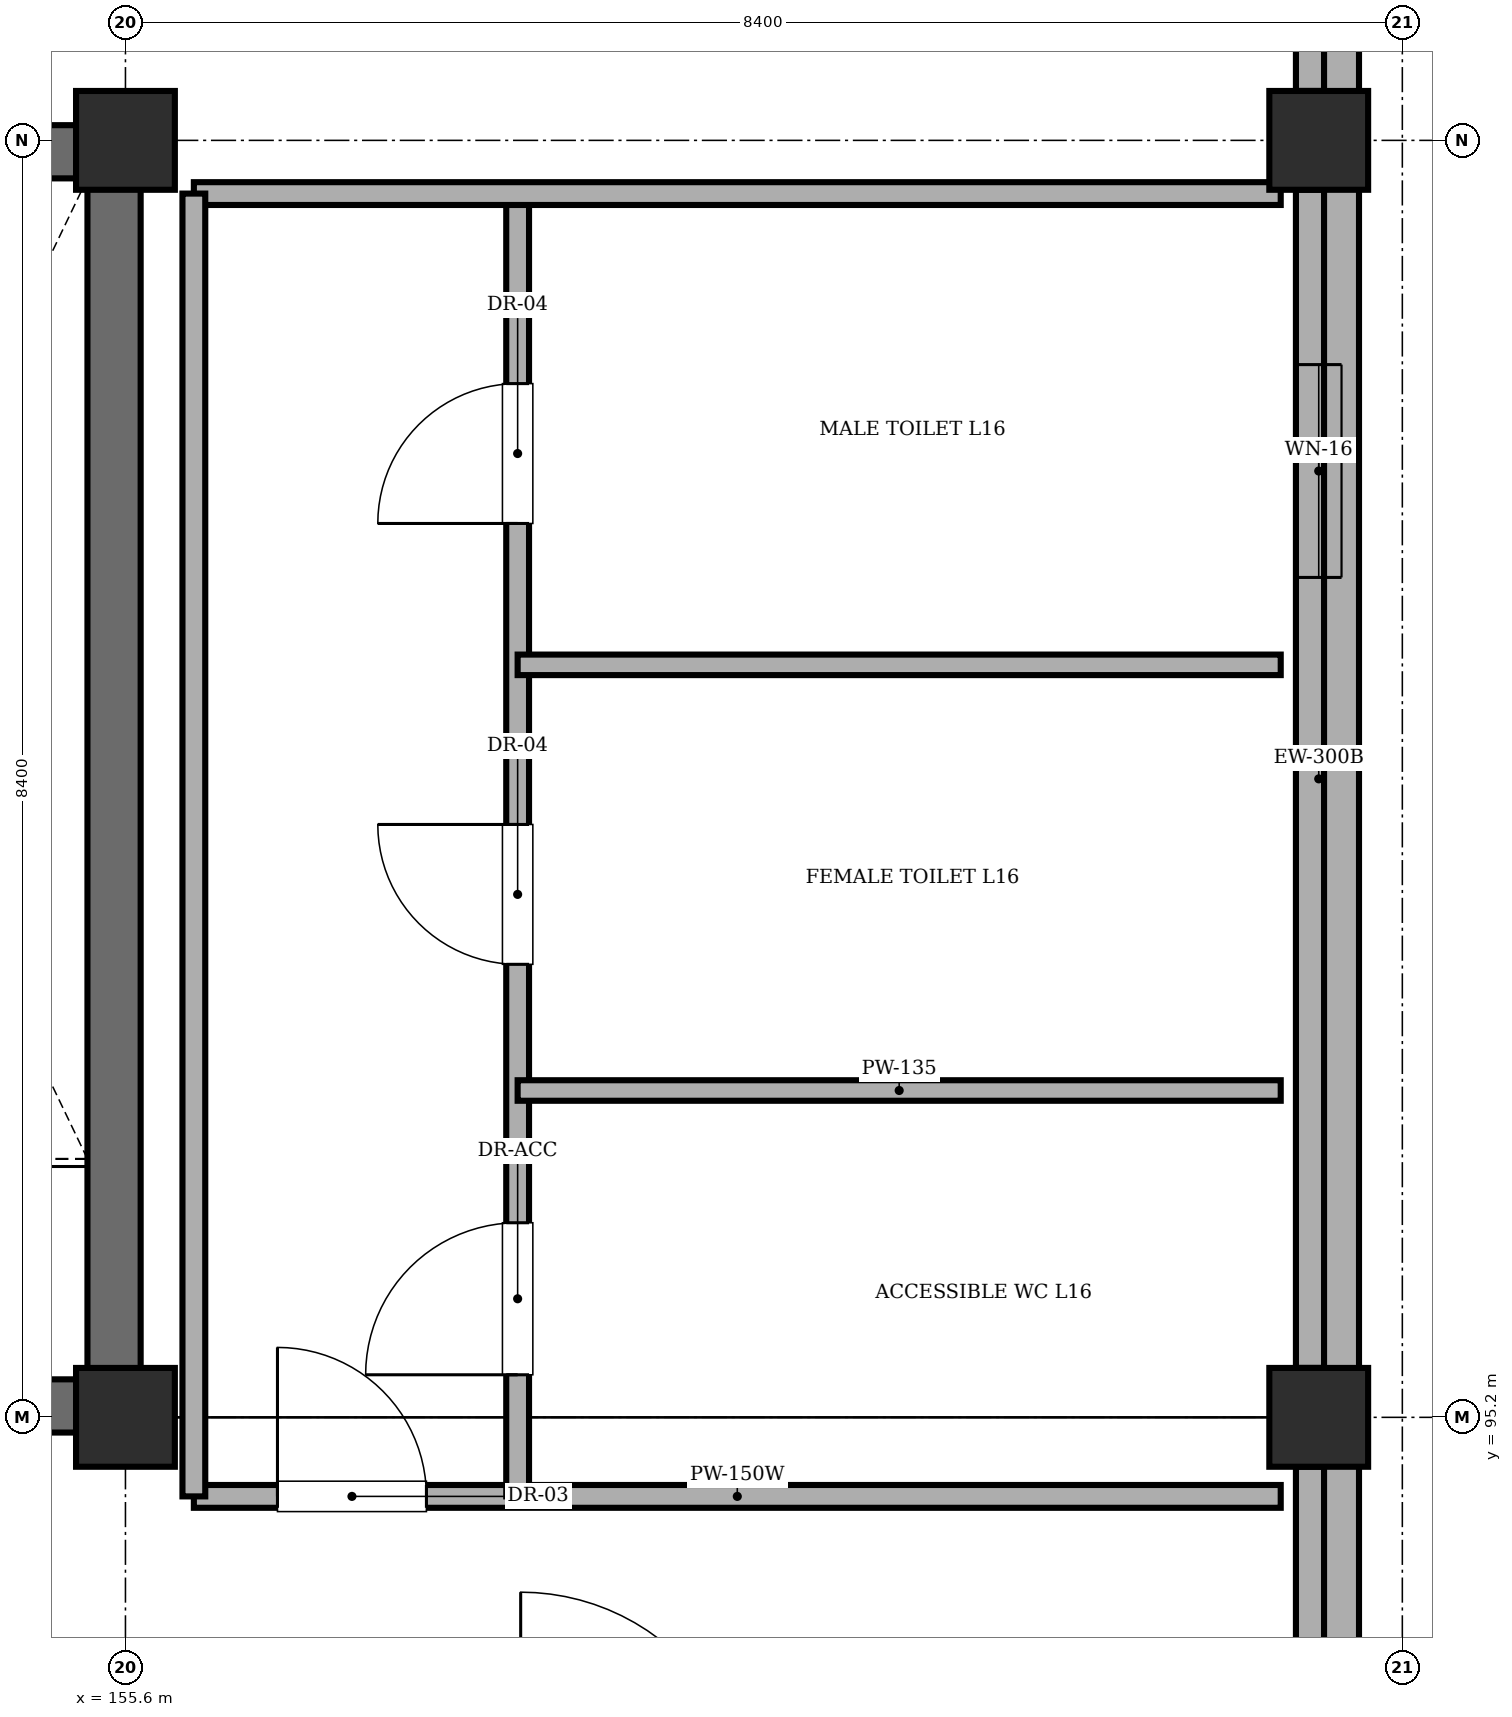
"""IFC4 building model, lengths in metres.
Left out: names, types, materials, properties, quantities, classifications, styles, units other than length and angle.
Written with IfcOpenShell. Run it as: python <this file> out.ifc"""

import sys

from ifc_helpers import new_model, si_unit, direction, frame, frame_2d, origin, origin_2d, place, context, subcontext, project, spatial, rectangle, extrude, element, fill, save


model = new_model("IFC4")
c1 = context("Model", 3, precision=1e-05, world=origin(), true_north=direction((0.0, 1.0)))
c2 = subcontext(c1, "Body", "Model", "MODEL_VIEW")
j1 = project(units=[si_unit("LENGTHUNIT", "METRE"), si_unit("PLANEANGLEUNIT", "RADIAN")], contexts=[c1])
p1 = place(None, origin())
s1 = spatial("IfcSite", under=j1, at=p1, CompositionType="ELEMENT")
p2 = place(p1, origin())
s2 = spatial("IfcBuilding", under=s1, at=p2, CompositionType="ELEMENT")
p3 = place(p2, frame((0.0, 0.0, 65.7)))
s3 = spatial("IfcBuildingStorey", under=s2, at=p3, CompositionType="ELEMENT", Elevation=65.7)
for number, where, z_axis, x_axis in (
    (1, (155.6, 95.2, 0.0), (0.0, 0.0, 1.0), (1.0, 0.0, 0.0)),
    (2, (155.6, 103.6, 0.0), (0.0, 0.0, 1.0), (1.0, 0.0, 0.0)),
    (3, (163.45, 95.2, 0.0), (0.0, 0.0, 1.0), (1.0, 0.0, 0.0)),
    (4, (163.45, 103.6, 0.0), (0.0, 0.0, 1.0), (1.0, 0.0, 0.0)),
):
    element("IfcColumn", number, at=place(p3, frame(where, z_axis=z_axis, x_axis=x_axis)), inside=s3, PredefinedType="COLUMN", context=c2, shape_type="SweptSolid", body=[
        extrude(rectangle(XDim=0.65, YDim=0.65, at=origin_2d()), origin(), (0.0, 0.0, 1.0), 4.3),
    ])
for number, where, z_axis, x_axis in (
    (5, (151.9, 95.275, 0.0), (0.0, 0.0, 1.0), (1.0, 0.0, 0.0)),
    (6, (151.9, 103.525, 0.0), (0.0, 0.0, 1.0), (1.0, 0.0, 0.0)),
):
    element("IfcWall", number, at=place(p3, frame(where, z_axis=z_axis, x_axis=x_axis)), inside=s3, PredefinedType="SHEAR", context=c2, shape_type="SweptSolid", body=[
        extrude(rectangle(XDim=3.8, YDim=0.35, at=frame_2d((1.9, 0.0))), origin(), (0.0, 0.0, 1.0), 4.3),
    ])
p4 = place(p3, frame((155.525, 95.45, 0.0), z_axis=(0.0, 0.0, 1.0), x_axis=(0.0, 1.0, 0.0)))
e7 = element("IfcWall", 7, at=p4, inside=s3, PredefinedType="SHEAR", context=c2, shape_type="SweptSolid", body=[
    extrude(rectangle(XDim=7.9, YDim=0.35, at=frame_2d((3.95, 0.0))), origin(), (0.0, 0.0, 1.0), 4.3),
])
p5 = place(p3, frame((163.45, 94.875, 0.0), z_axis=(0.0, 0.0, 1.0), x_axis=(0.0, -1.0, 0.0)))
e8 = element("IfcWall", 8, at=p5, inside=s3, PredefinedType="STANDARD", context=c2, shape_type="SweptSolid", body=[
    extrude(rectangle(XDim=7.75, YDim=0.3, at=frame_2d((3.875, 0.0))), origin(), (0.0, 0.0, 1.0), 3.7),
])
p6 = place(p5, frame((4.2, 0.0, 1.1)))
e9 = element("IfcOpeningElement", 9, at=p6, cuts=e8, PredefinedType="OPENING", context=c2, shape_type="SweptSolid", body=[
    extrude(rectangle(XDim=1.8, YDim=1.8, at=frame_2d((0.9, 0.9))), frame((0.0, 0.16, 0.0), z_axis=(0.0, -1.0, 0.0), x_axis=(1.0, 0.0, 0.0)), (0.0, 0.0, 1.0), 0.32),
])
p7 = place(p3, frame((163.45, 103.275, 0.0), z_axis=(0.0, 0.0, 1.0), x_axis=(0.0, -1.0, 0.0)))
e10 = element("IfcWall", 10, at=p7, inside=s3, PredefinedType="STANDARD", context=c2, shape_type="SweptSolid", body=[
    extrude(rectangle(XDim=7.75, YDim=0.3, at=frame_2d((3.875, 0.0))), origin(), (0.0, 0.0, 1.0), 3.7),
])
p8 = place(p7, frame((1.15, 0.0, 1.1)))
e11 = element("IfcOpeningElement", 11, at=p8, cuts=e10, PredefinedType="OPENING", context=c2, shape_type="SweptSolid", body=[
    extrude(rectangle(XDim=1.4, YDim=1.4, at=frame_2d((0.7, 0.7))), frame((0.0, 0.16, 0.0), z_axis=(0.0, -1.0, 0.0), x_axis=(1.0, 0.0, 0.0)), (0.0, 0.0, 1.0), 0.32),
])
p9 = place(p3, frame((163.45, 111.125, 0.0), z_axis=(0.0, 0.0, 1.0), x_axis=(0.0, -1.0, 0.0)))
e12 = element("IfcWall", 12, at=p9, inside=s3, PredefinedType="STANDARD", context=c2, shape_type="SweptSolid", body=[
    extrude(rectangle(XDim=7.2, YDim=0.3, at=frame_2d((3.6, 0.0))), origin(), (0.0, 0.0, 1.0), 3.7),
])
p10 = place(p9, frame((1.15, 0.0, 1.1)))
e13 = element("IfcOpeningElement", 13, at=p10, cuts=e12, PredefinedType="OPENING", context=c2, shape_type="SweptSolid", body=[
    extrude(rectangle(XDim=1.8, YDim=1.8, at=frame_2d((0.9, 0.9))), frame((0.0, 0.16, 0.0), z_axis=(0.0, -1.0, 0.0), x_axis=(1.0, 0.0, 0.0)), (0.0, 0.0, 1.0), 0.32),
])
p11 = place(p3, frame((163.6, 78.515, 4.5), z_axis=(0.0, 0.0, 1.0), x_axis=(0.0, 1.0, 0.0)))
e14 = element("IfcWall", 14, at=p11, inside=s3, PredefinedType="PARAPET", context=c2, shape_type="SweptSolid", body=[
    extrude(rectangle(XDim=32.97, YDim=0.23, at=frame_2d((16.485, 0.0))), origin(), (0.0, 0.0, 1.0), 1.35),
])
p12 = place(p3, frame((156.05, 94.68, 0.0), z_axis=(0.0, 0.0, 1.0), x_axis=(1.0, 0.0, 0.0)))
e15 = element("IfcWall", 15, at=p12, inside=s3, PredefinedType="PARTITIONING", context=c2, shape_type="SweptSolid", body=[
    extrude(rectangle(XDim=7.15, YDim=0.15, at=frame_2d((3.575, 0.0))), origin(), (0.0, 0.0, 1.0), 4.3),
])
p13 = place(p12, frame((0.55, 0.0, 0.0)))
e16 = element("IfcOpeningElement", 16, at=p13, cuts=e15, PredefinedType="OPENING", context=c2, shape_type="SweptSolid", body=[
    extrude(rectangle(XDim=0.98, YDim=2.12, at=frame_2d((0.49, 1.06))), frame((0.0, 0.085, 0.0), z_axis=(0.0, -1.0, 0.0), x_axis=(1.0, 0.0, 0.0)), (0.0, 0.0, 1.0), 0.17),
])
p14 = place(p3, frame((158.18, 94.68, 0.0), z_axis=(0.0, 0.0, 1.0), x_axis=(0.0, 1.0, 0.0)))
e17 = element("IfcWall", 17, at=p14, inside=s3, PredefinedType="PARTITIONING", context=c2, shape_type="SweptSolid", body=[
    extrude(rectangle(XDim=8.57, YDim=0.15, at=frame_2d((4.285, 0.0))), origin(), (0.0, 0.0, 1.0), 4.3),
])
p15 = place(p14, frame((0.8, 0.0, 0.0)))
e18 = element("IfcOpeningElement", 18, at=p15, cuts=e17, PredefinedType="OPENING", context=c2, shape_type="SweptSolid", body=[
    extrude(rectangle(XDim=1.0, YDim=2.12, at=frame_2d((0.5, 1.06))), frame((0.0, 0.085, 0.0), z_axis=(0.0, -1.0, 0.0), x_axis=(1.0, 0.0, 0.0)), (0.0, 0.0, 1.0), 0.17),
])
p16 = place(p14, frame((3.5, 0.0, 0.0)))
e19 = element("IfcOpeningElement", 19, at=p16, cuts=e17, PredefinedType="OPENING", context=c2, shape_type="SweptSolid", body=[
    extrude(rectangle(XDim=0.92, YDim=2.1, at=frame_2d((0.46, 1.05))), frame((0.0, 0.085, 0.0), z_axis=(0.0, -1.0, 0.0), x_axis=(1.0, 0.0, 0.0)), (0.0, 0.0, 1.0), 0.17),
])
p17 = place(p14, frame((6.4, 0.0, 0.0)))
e20 = element("IfcOpeningElement", 20, at=p17, cuts=e17, PredefinedType="OPENING", context=c2, shape_type="SweptSolid", body=[
    extrude(rectangle(XDim=0.92, YDim=2.1, at=frame_2d((0.46, 1.05))), frame((0.0, 0.085, 0.0), z_axis=(0.0, -1.0, 0.0), x_axis=(1.0, 0.0, 0.0)), (0.0, 0.0, 1.0), 0.17),
])
for number, where, z_axis, x_axis in (
    (21, (158.18, 97.35, 0.0), (0.0, 0.0, 1.0), (1.0, 0.0, 0.0)),
    (22, (158.18, 100.15, 0.0), (0.0, 0.0, 1.0), (1.0, 0.0, 0.0)),
):
    element("IfcWall", number, at=place(p3, frame(where, z_axis=z_axis, x_axis=x_axis)), inside=s3, PredefinedType="PARTITIONING", context=c2, shape_type="SweptSolid", body=[
        extrude(rectangle(XDim=5.02, YDim=0.135, at=frame_2d((2.51, 0.0))), origin(), (0.0, 0.0, 1.0), 4.3),
    ])
p18 = place(p3, frame((156.05, 103.25, 0.0), z_axis=(0.0, 0.0, 1.0), x_axis=(1.0, 0.0, 0.0)))
e23 = element("IfcWall", 23, at=p18, inside=s3, PredefinedType="PARTITIONING", context=c2, shape_type="SweptSolid", body=[
    extrude(rectangle(XDim=7.15, YDim=0.15, at=frame_2d((3.575, 0.0))), origin(), (0.0, 0.0, 1.0), 4.3),
])
p19 = place(p3, frame((156.05, 94.68, 0.0), z_axis=(0.0, 0.0, 1.0), x_axis=(0.0, 1.0, 0.0)))
e24 = element("IfcWall", 24, at=p19, inside=s3, PredefinedType="PARTITIONING", context=c2, shape_type="SweptSolid", body=[
    extrude(rectangle(XDim=8.57, YDim=0.15, at=frame_2d((4.285, 0.0))), origin(), (0.0, 0.0, 1.0), 4.3),
])
p20 = place(p8, origin())
e25 = element("IfcWindow", 25, at=p20, inside=s3, PartitioningType="SINGLE_PANEL", PredefinedType="WINDOW", context=c2, shape_type="SweptSolid", body=[
    extrude(rectangle(XDim=1.4, YDim=1.4, at=frame_2d((0.7, 0.7))), frame((0.0, 0.03, 0.0), z_axis=(0.0, -1.0, 0.0), x_axis=(1.0, 0.0, 0.0)), (0.0, 0.0, 1.0), 0.06),
])
fill(e11, e25)
p21 = place(p13, origin())
e26 = element("IfcDoor", 26, at=p21, inside=s3, OperationType="SINGLE_SWING_LEFT", PredefinedType="DOOR", context=c2, shape_type="SweptSolid", body=[
    extrude(rectangle(XDim=0.98, YDim=2.12, at=frame_2d((0.49, 1.06))), frame((0.0, 0.025, 0.0), z_axis=(0.0, -1.0, 0.0), x_axis=(1.0, 0.0, 0.0)), (0.0, 0.0, 1.0), 0.05),
])
fill(e16, e26)
p22 = place(p15, origin())
e27 = element("IfcDoor", 27, at=p22, inside=s3, OperationType="SINGLE_SWING_LEFT", PredefinedType="DOOR", context=c2, shape_type="SweptSolid", body=[
    extrude(rectangle(XDim=1.0, YDim=2.12, at=frame_2d((0.5, 1.06))), frame((0.0, 0.025, 0.0), z_axis=(0.0, -1.0, 0.0), x_axis=(1.0, 0.0, 0.0)), (0.0, 0.0, 1.0), 0.05),
])
fill(e18, e27)
p23 = place(p16, origin())
e28 = element("IfcDoor", 28, at=p23, inside=s3, OperationType="SINGLE_SWING_RIGHT", PredefinedType="DOOR", context=c2, shape_type="SweptSolid", body=[
    extrude(rectangle(XDim=0.92, YDim=2.1, at=frame_2d((0.46, 1.05))), frame((0.0, 0.025, 0.0), z_axis=(0.0, -1.0, 0.0), x_axis=(1.0, 0.0, 0.0)), (0.0, 0.0, 1.0), 0.05),
])
fill(e19, e28)
p24 = place(p17, origin())
e29 = element("IfcDoor", 29, at=p24, inside=s3, OperationType="SINGLE_SWING_LEFT", PredefinedType="DOOR", context=c2, shape_type="SweptSolid", body=[
    extrude(rectangle(XDim=0.92, YDim=2.1, at=frame_2d((0.46, 1.05))), frame((0.0, 0.025, 0.0), z_axis=(0.0, -1.0, 0.0), x_axis=(1.0, 0.0, 0.0)), (0.0, 0.0, 1.0), 0.05),
])
fill(e20, e29)
save(model, sys.argv[1])
